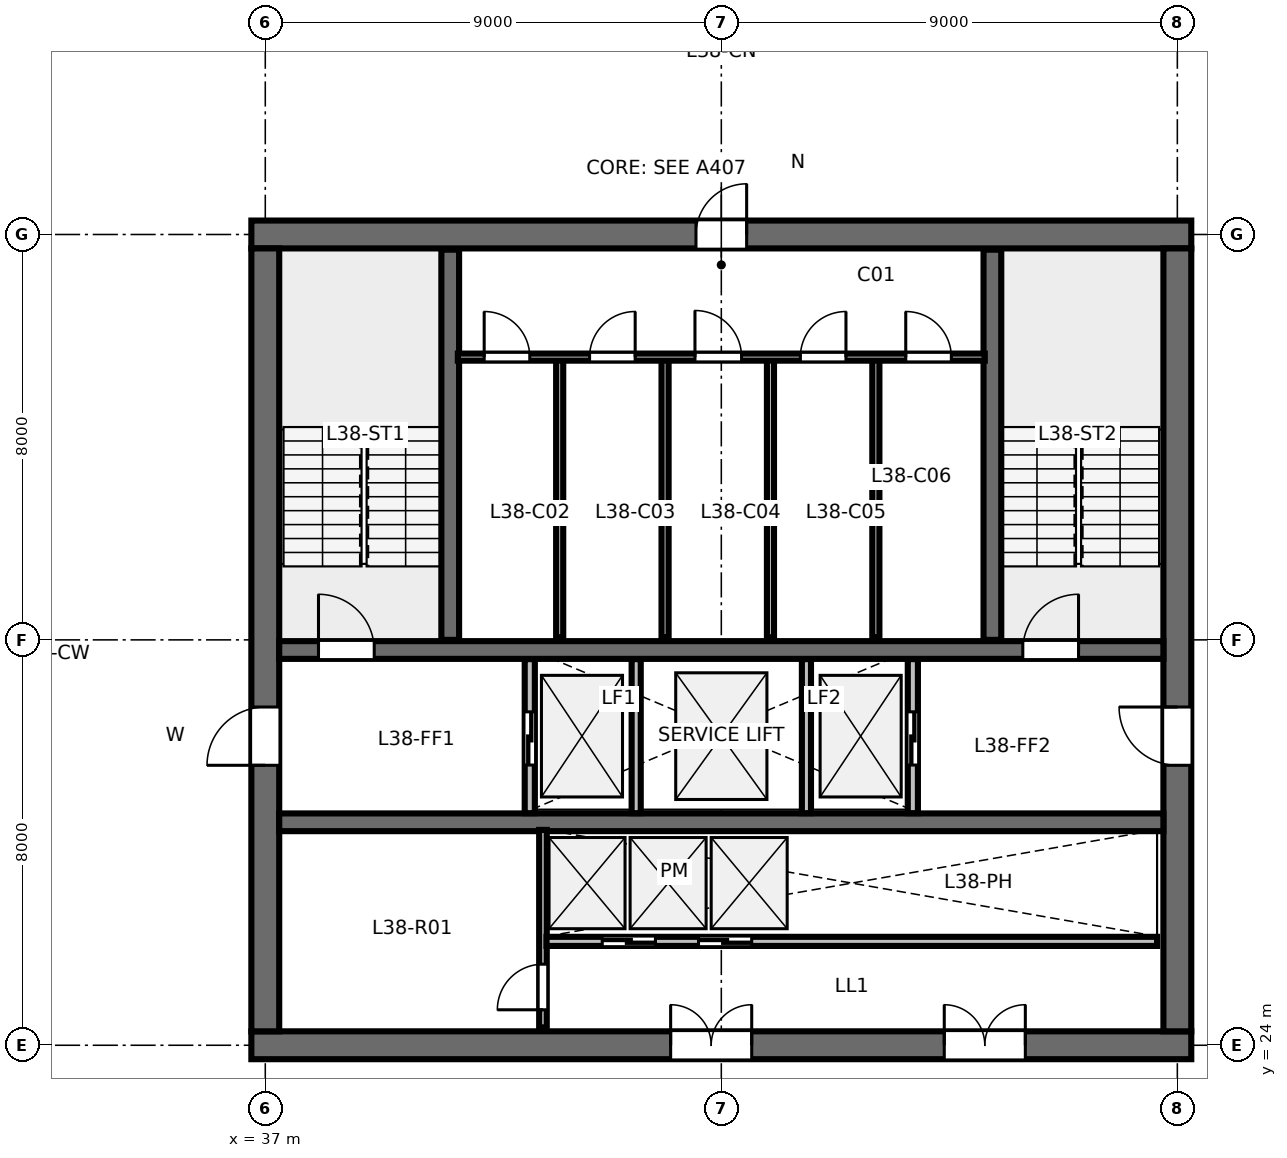
"""IFC4 building model, lengths in metres.
Left out: names, types, materials, properties, quantities, classifications, styles, units other than length and angle.
Written with IfcOpenShell. Run it as: python <this file> out.ifc"""

import sys

from ifc_helpers import new_model, si_unit, direction, frame, frame_2d, origin, place, context, subcontext, project, spatial, rectangle, extrude, element, fill, save


model = new_model("IFC4")
c1 = context("Model", 3, precision=1e-05, world=origin(), true_north=direction((0.0, 1.0)))
c2 = subcontext(c1, "Body", "Model", "MODEL_VIEW")
j1 = project(units=[si_unit("LENGTHUNIT", "METRE"), si_unit("PLANEANGLEUNIT", "RADIAN")], contexts=[c1])
p1 = place(None, origin())
s1 = spatial("IfcSite", under=j1, at=p1, CompositionType="ELEMENT")
p2 = place(p1, origin())
s2 = spatial("IfcBuilding", under=s1, at=p2, CompositionType="ELEMENT")
p3 = place(p2, frame((0.0, 0.0, 145.6)))
s3 = spatial("IfcBuildingStorey", under=s2, at=p3, CompositionType="ELEMENT", Elevation=145.6)
p4 = place(p3, frame((36.725, 24.0, 0.0), z_axis=(0.0, 0.0, 1.0), x_axis=(1.0, 0.0, 0.0)))
e1 = element("IfcWall", 1, at=p4, inside=s3, PredefinedType="SHEAR", context=c2, shape_type="SweptSolid", body=[
    extrude(rectangle(XDim=18.55, YDim=0.55, at=frame_2d((9.275, 0.0))), origin(), (0.0, 0.0, 1.0), 3.36),
])
p5 = place(p4, frame((8.275, 0.0, 0.0)))
e2 = element("IfcOpeningElement", 2, at=p5, cuts=e1, PredefinedType="OPENING", context=c2, shape_type="SweptSolid", body=[
    extrude(rectangle(XDim=1.6, YDim=2.15, at=frame_2d((0.8, 1.075))), frame((0.0, 0.285, 0.0), z_axis=(0.0, -1.0, 0.0), x_axis=(1.0, 0.0, 0.0)), (0.0, 0.0, 1.0), 0.57),
])
p6 = place(p4, frame((13.675, 0.0, 0.0)))
e3 = element("IfcOpeningElement", 3, at=p6, cuts=e1, PredefinedType="OPENING", context=c2, shape_type="SweptSolid", body=[
    extrude(rectangle(XDim=1.6, YDim=2.15, at=frame_2d((0.8, 1.075))), frame((0.0, 0.285, 0.0), z_axis=(0.0, -1.0, 0.0), x_axis=(1.0, 0.0, 0.0)), (0.0, 0.0, 1.0), 0.57),
])
p7 = place(p3, frame((36.725, 40.0, 0.0), z_axis=(0.0, 0.0, 1.0), x_axis=(1.0, 0.0, 0.0)))
e4 = element("IfcWall", 4, at=p7, inside=s3, PredefinedType="SHEAR", context=c2, shape_type="SweptSolid", body=[
    extrude(rectangle(XDim=18.55, YDim=0.55, at=frame_2d((9.275, 0.0))), origin(), (0.0, 0.0, 1.0), 3.36),
])
p8 = place(p7, frame((8.775, 0.0, 0.0)))
e5 = element("IfcOpeningElement", 5, at=p8, cuts=e4, PredefinedType="OPENING", context=c2, shape_type="SweptSolid", body=[
    extrude(rectangle(XDim=1.0, YDim=2.15, at=frame_2d((0.5, 1.075))), frame((0.0, 0.285, 0.0), z_axis=(0.0, -1.0, 0.0), x_axis=(1.0, 0.0, 0.0)), (0.0, 0.0, 1.0), 0.57),
])
p9 = place(p3, frame((37.0, 24.275, 0.0), z_axis=(0.0, 0.0, 1.0), x_axis=(0.0, 1.0, 0.0)))
e6 = element("IfcWall", 6, at=p9, inside=s3, PredefinedType="SHEAR", context=c2, shape_type="SweptSolid", body=[
    extrude(rectangle(XDim=15.45, YDim=0.55, at=frame_2d((7.725, 0.0))), origin(), (0.0, 0.0, 1.0), 3.36),
])
p10 = place(p9, frame((5.25, 0.0, 0.0)))
e7 = element("IfcOpeningElement", 7, at=p10, cuts=e6, PredefinedType="OPENING", context=c2, shape_type="SweptSolid", body=[
    extrude(rectangle(XDim=1.15, YDim=2.15, at=frame_2d((0.575, 1.075))), frame((0.0, 0.285, 0.0), z_axis=(0.0, -1.0, 0.0), x_axis=(1.0, 0.0, 0.0)), (0.0, 0.0, 1.0), 0.57),
])
p11 = place(p3, frame((55.0, 24.275, 0.0), z_axis=(0.0, 0.0, 1.0), x_axis=(0.0, 1.0, 0.0)))
e8 = element("IfcWall", 8, at=p11, inside=s3, PredefinedType="SHEAR", context=c2, shape_type="SweptSolid", body=[
    extrude(rectangle(XDim=15.45, YDim=0.55, at=frame_2d((7.725, 0.0))), origin(), (0.0, 0.0, 1.0), 3.36),
])
p12 = place(p11, frame((5.25, 0.0, 0.0)))
e9 = element("IfcOpeningElement", 9, at=p12, cuts=e8, PredefinedType="OPENING", context=c2, shape_type="SweptSolid", body=[
    extrude(rectangle(XDim=1.15, YDim=2.15, at=frame_2d((0.575, 1.075))), frame((0.0, 0.285, 0.0), z_axis=(0.0, -1.0, 0.0), x_axis=(1.0, 0.0, 0.0)), (0.0, 0.0, 1.0), 0.57),
])
p13 = place(p3, frame((37.275, 31.8, 0.0), z_axis=(0.0, 0.0, 1.0), x_axis=(1.0, 0.0, 0.0)))
e10 = element("IfcWall", 10, at=p13, inside=s3, PredefinedType="SHEAR", context=c2, shape_type="SweptSolid", body=[
    extrude(rectangle(XDim=17.45, YDim=0.35, at=frame_2d((8.725, 0.0))), origin(), (0.0, 0.0, 1.0), 3.36),
])
p14 = place(p13, frame((0.775, 0.0, 0.0)))
e11 = element("IfcOpeningElement", 11, at=p14, cuts=e10, PredefinedType="OPENING", context=c2, shape_type="SweptSolid", body=[
    extrude(rectangle(XDim=1.1, YDim=2.15, at=frame_2d((0.55, 1.075))), frame((0.0, 0.185, 0.0), z_axis=(0.0, -1.0, 0.0), x_axis=(1.0, 0.0, 0.0)), (0.0, 0.0, 1.0), 0.37),
])
p15 = place(p13, frame((14.675, 0.0, 0.0)))
e12 = element("IfcOpeningElement", 12, at=p15, cuts=e10, PredefinedType="OPENING", context=c2, shape_type="SweptSolid", body=[
    extrude(rectangle(XDim=1.1, YDim=2.15, at=frame_2d((0.55, 1.075))), frame((0.0, 0.185, 0.0), z_axis=(0.0, -1.0, 0.0), x_axis=(1.0, 0.0, 0.0)), (0.0, 0.0, 1.0), 0.37),
])
p16 = place(p3, frame((37.275, 28.4, 0.0), z_axis=(0.0, 0.0, 1.0), x_axis=(1.0, 0.0, 0.0)))
e13 = element("IfcWall", 13, at=p16, inside=s3, PredefinedType="SHEAR", context=c2, shape_type="SweptSolid", body=[
    extrude(rectangle(XDim=17.45, YDim=0.35, at=frame_2d((8.725, 0.0))), origin(), (0.0, 0.0, 1.0), 3.36),
])
for number, where, z_axis, x_axis in (
    (14, (40.65, 32.0, 0.0), (0.0, 0.0, 1.0), (0.0, 1.0, 0.0)),
    (15, (51.35, 32.0, 0.0), (0.0, 0.0, 1.0), (0.0, 1.0, 0.0)),
):
    element("IfcWall", number, at=place(p3, frame(where, z_axis=z_axis, x_axis=x_axis)), inside=s3, PredefinedType="SHEAR", context=c2, shape_type="SweptSolid", body=[
        extrude(rectangle(XDim=7.7, YDim=0.35, at=frame_2d((3.85, 0.0))), origin(), (0.0, 0.0, 1.0), 3.6),
    ])
for number, where, z_axis, x_axis in (
    (16, (42.81, 32.05, 0.0), (0.0, 0.0, 1.0), (0.0, 1.0, 0.0)),
    (17, (44.89, 32.05, 0.0), (0.0, 0.0, 1.0), (0.0, 1.0, 0.0)),
    (18, (46.97, 32.05, 0.0), (0.0, 0.0, 1.0), (0.0, 1.0, 0.0)),
    (19, (49.05, 32.05, 0.0), (0.0, 0.0, 1.0), (0.0, 1.0, 0.0)),
):
    element("IfcWall", number, at=place(p3, frame(where, z_axis=z_axis, x_axis=x_axis)), inside=s3, PredefinedType="PARTITIONING", context=c2, shape_type="SweptSolid", body=[
        extrude(rectangle(XDim=5.5, YDim=0.14, at=frame_2d((2.75, 0.0))), origin(), (0.0, 0.0, 1.0), 3.36),
    ])
p17 = place(p3, frame((40.8, 37.58, 0.0), z_axis=(0.0, 0.0, 1.0), x_axis=(1.0, 0.0, 0.0)))
e20 = element("IfcWall", 20, at=p17, inside=s3, PredefinedType="PARTITIONING", context=c2, shape_type="SweptSolid", body=[
    extrude(rectangle(XDim=10.4, YDim=0.14, at=frame_2d((5.2, 0.0))), origin(), (0.0, 0.0, 1.0), 3.36),
])
p18 = place(p17, frame((0.52, 0.0, 0.0)))
e21 = element("IfcOpeningElement", 21, at=p18, cuts=e20, PredefinedType="OPENING", context=c2, shape_type="SweptSolid", body=[
    extrude(rectangle(XDim=0.9, YDim=2.15, at=frame_2d((0.45, 1.075))), frame((0.0, 0.08, 0.0), z_axis=(0.0, -1.0, 0.0), x_axis=(1.0, 0.0, 0.0)), (0.0, 0.0, 1.0), 0.16),
])
p19 = place(p17, frame((2.6, 0.0, 0.0)))
e22 = element("IfcOpeningElement", 22, at=p19, cuts=e20, PredefinedType="OPENING", context=c2, shape_type="SweptSolid", body=[
    extrude(rectangle(XDim=0.9, YDim=2.15, at=frame_2d((0.45, 1.075))), frame((0.0, 0.08, 0.0), z_axis=(0.0, -1.0, 0.0), x_axis=(1.0, 0.0, 0.0)), (0.0, 0.0, 1.0), 0.16),
])
p20 = place(p17, frame((4.68, 0.0, 0.0)))
e23 = element("IfcOpeningElement", 23, at=p20, cuts=e20, PredefinedType="OPENING", context=c2, shape_type="SweptSolid", body=[
    extrude(rectangle(XDim=0.92, YDim=2.15, at=frame_2d((0.46, 1.075))), frame((0.0, 0.08, 0.0), z_axis=(0.0, -1.0, 0.0), x_axis=(1.0, 0.0, 0.0)), (0.0, 0.0, 1.0), 0.16),
])
p21 = place(p17, frame((6.76, 0.0, 0.0)))
e24 = element("IfcOpeningElement", 24, at=p21, cuts=e20, PredefinedType="OPENING", context=c2, shape_type="SweptSolid", body=[
    extrude(rectangle(XDim=0.9, YDim=2.15, at=frame_2d((0.45, 1.075))), frame((0.0, 0.08, 0.0), z_axis=(0.0, -1.0, 0.0), x_axis=(1.0, 0.0, 0.0)), (0.0, 0.0, 1.0), 0.16),
])
p22 = place(p17, frame((8.84, 0.0, 0.0)))
e25 = element("IfcOpeningElement", 25, at=p22, cuts=e20, PredefinedType="OPENING", context=c2, shape_type="SweptSolid", body=[
    extrude(rectangle(XDim=0.9, YDim=2.15, at=frame_2d((0.45, 1.075))), frame((0.0, 0.08, 0.0), z_axis=(0.0, -1.0, 0.0), x_axis=(1.0, 0.0, 0.0)), (0.0, 0.0, 1.0), 0.16),
])
p23 = place(p3, frame((42.22, 28.58, 0.0), z_axis=(0.0, 0.0, 1.0), x_axis=(0.0, 1.0, 0.0)))
e26 = element("IfcWall", 26, at=p23, inside=s3, PredefinedType="PARTITIONING", context=c2, shape_type="SweptSolid", body=[
    extrude(rectangle(XDim=3.04, YDim=0.2, at=frame_2d((1.52, 0.0))), origin(), (0.0, 0.0, 1.0), 3.36),
])
p24 = place(p23, frame((0.95, 0.0, 0.0)))
e27 = element("IfcOpeningElement", 27, at=p24, cuts=e26, PredefinedType="OPENING", context=c2, shape_type="SweptSolid", body=[
    extrude(rectangle(XDim=1.05, YDim=2.15, at=frame_2d((0.525, 1.075))), frame((0.0, 0.11, 0.0), z_axis=(0.0, -1.0, 0.0), x_axis=(1.0, 0.0, 0.0)), (0.0, 0.0, 1.0), 0.22),
])
p25 = place(p3, frame((49.78, 28.58, 0.0), z_axis=(0.0, 0.0, 1.0), x_axis=(0.0, 1.0, 0.0)))
e28 = element("IfcWall", 28, at=p25, inside=s3, PredefinedType="PARTITIONING", context=c2, shape_type="SweptSolid", body=[
    extrude(rectangle(XDim=3.04, YDim=0.2, at=frame_2d((1.52, 0.0))), origin(), (0.0, 0.0, 1.0), 3.36),
])
p26 = place(p25, frame((0.95, 0.0, 0.0)))
e29 = element("IfcOpeningElement", 29, at=p26, cuts=e28, PredefinedType="OPENING", context=c2, shape_type="SweptSolid", body=[
    extrude(rectangle(XDim=1.05, YDim=2.15, at=frame_2d((0.525, 1.075))), frame((0.0, 0.11, 0.0), z_axis=(0.0, -1.0, 0.0), x_axis=(1.0, 0.0, 0.0)), (0.0, 0.0, 1.0), 0.22),
])
for number, where, z_axis, x_axis in (
    (30, (44.32, 28.58, 0.0), (0.0, 0.0, 1.0), (0.0, 1.0, 0.0)),
    (31, (47.68, 28.58, 0.0), (0.0, 0.0, 1.0), (0.0, 1.0, 0.0)),
):
    element("IfcWall", number, at=place(p3, frame(where, z_axis=z_axis, x_axis=x_axis)), inside=s3, PredefinedType="PARTITIONING", context=c2, shape_type="SweptSolid", body=[
        extrude(rectangle(XDim=3.04, YDim=0.18, at=frame_2d((1.52, 0.0))), origin(), (0.0, 0.0, 1.0), 3.36),
    ])
p27 = place(p3, frame((42.48, 24.35, 0.0), z_axis=(0.0, 0.0, 1.0), x_axis=(0.0, 1.0, 0.0)))
e32 = element("IfcWall", 32, at=p27, inside=s3, PredefinedType="PARTITIONING", context=c2, shape_type="SweptSolid", body=[
    extrude(rectangle(XDim=3.9, YDim=0.15, at=frame_2d((1.95, 0.0))), origin(), (0.0, 0.0, 1.0), 3.36),
])
p28 = place(p27, frame((0.35, 0.0, 0.0)))
e33 = element("IfcOpeningElement", 33, at=p28, cuts=e32, PredefinedType="OPENING", context=c2, shape_type="SweptSolid", body=[
    extrude(rectangle(XDim=0.9, YDim=2.15, at=frame_2d((0.45, 1.075))), frame((0.0, 0.085, 0.0), z_axis=(0.0, -1.0, 0.0), x_axis=(1.0, 0.0, 0.0)), (0.0, 0.0, 1.0), 0.17),
])
p29 = place(p3, frame((42.55, 26.05, 0.0), z_axis=(0.0, 0.0, 1.0), x_axis=(1.0, 0.0, 0.0)))
e34 = element("IfcWall", 34, at=p29, inside=s3, PredefinedType="PARTITIONING", context=c2, shape_type="SweptSolid", body=[
    extrude(rectangle(XDim=12.05, YDim=0.18, at=frame_2d((6.025, 0.0))), origin(), (0.0, 0.0, 1.0), 3.36),
])
p30 = place(p29, frame((1.1, 0.0, 0.0)))
e35 = element("IfcOpeningElement", 35, at=p30, cuts=e34, PredefinedType="OPENING", context=c2, shape_type="SweptSolid", body=[
    extrude(rectangle(XDim=1.05, YDim=2.15, at=frame_2d((0.525, 1.075))), frame((0.0, 0.1, 0.0), z_axis=(0.0, -1.0, 0.0), x_axis=(1.0, 0.0, 0.0)), (0.0, 0.0, 1.0), 0.2),
])
p31 = place(p29, frame((3.0, 0.0, 0.0)))
e36 = element("IfcOpeningElement", 36, at=p31, cuts=e34, PredefinedType="OPENING", context=c2, shape_type="SweptSolid", body=[
    extrude(rectangle(XDim=1.05, YDim=2.15, at=frame_2d((0.525, 1.075))), frame((0.0, 0.1, 0.0), z_axis=(0.0, -1.0, 0.0), x_axis=(1.0, 0.0, 0.0)), (0.0, 0.0, 1.0), 0.2),
])
p32 = place(p14, origin())
e37 = element("IfcDoor", 37, at=p32, inside=s3, OperationType="SINGLE_SWING_LEFT", PredefinedType="DOOR", context=c2, shape_type="SweptSolid", body=[
    extrude(rectangle(XDim=1.1, YDim=2.15, at=frame_2d((0.55, 1.075))), frame((0.0, 0.025, 0.0), z_axis=(0.0, -1.0, 0.0), x_axis=(1.0, 0.0, 0.0)), (0.0, 0.0, 1.0), 0.05),
])
fill(e11, e37)
p33 = place(p15, origin())
e38 = element("IfcDoor", 38, at=p33, inside=s3, OperationType="SINGLE_SWING_RIGHT", PredefinedType="DOOR", context=c2, shape_type="SweptSolid", body=[
    extrude(rectangle(XDim=1.1, YDim=2.15, at=frame_2d((0.55, 1.075))), frame((0.0, 0.025, 0.0), z_axis=(0.0, -1.0, 0.0), x_axis=(1.0, 0.0, 0.0)), (0.0, 0.0, 1.0), 0.05),
])
fill(e12, e38)
p34 = place(p8, origin())
e39 = element("IfcDoor", 39, at=p34, inside=s3, OperationType="SINGLE_SWING_RIGHT", PredefinedType="DOOR", context=c2, shape_type="SweptSolid", body=[
    extrude(rectangle(XDim=1.0, YDim=2.15, at=frame_2d((0.5, 1.075))), frame((0.0, 0.025, 0.0), z_axis=(0.0, -1.0, 0.0), x_axis=(1.0, 0.0, 0.0)), (0.0, 0.0, 1.0), 0.05),
])
fill(e5, e39)
p35 = place(p10, origin())
e40 = element("IfcDoor", 40, at=p35, inside=s3, OperationType="SINGLE_SWING_LEFT", PredefinedType="DOOR", context=c2, shape_type="SweptSolid", body=[
    extrude(rectangle(XDim=1.15, YDim=2.15, at=frame_2d((0.575, 1.075))), frame((0.0, 0.025, 0.0), z_axis=(0.0, -1.0, 0.0), x_axis=(1.0, 0.0, 0.0)), (0.0, 0.0, 1.0), 0.05),
])
fill(e7, e40)
p36 = place(p12, origin())
e41 = element("IfcDoor", 41, at=p36, inside=s3, OperationType="SINGLE_SWING_RIGHT", PredefinedType="DOOR", context=c2, shape_type="SweptSolid", body=[
    extrude(rectangle(XDim=1.15, YDim=2.15, at=frame_2d((0.575, 1.075))), frame((0.0, 0.025, 0.0), z_axis=(0.0, -1.0, 0.0), x_axis=(1.0, 0.0, 0.0)), (0.0, 0.0, 1.0), 0.05),
])
fill(e9, e41)
p37 = place(p5, origin())
e42 = element("IfcDoor", 42, at=p37, inside=s3, OperationType="DOUBLE_DOOR_SINGLE_SWING", PredefinedType="DOOR", context=c2, shape_type="SweptSolid", body=[
    extrude(rectangle(XDim=1.6, YDim=2.15, at=frame_2d((0.8, 1.075))), frame((0.0, 0.025, 0.0), z_axis=(0.0, -1.0, 0.0), x_axis=(1.0, 0.0, 0.0)), (0.0, 0.0, 1.0), 0.05),
])
fill(e2, e42)
p38 = place(p6, origin())
e43 = element("IfcDoor", 43, at=p38, inside=s3, OperationType="DOUBLE_DOOR_SINGLE_SWING", PredefinedType="DOOR", context=c2, shape_type="SweptSolid", body=[
    extrude(rectangle(XDim=1.6, YDim=2.15, at=frame_2d((0.8, 1.075))), frame((0.0, 0.025, 0.0), z_axis=(0.0, -1.0, 0.0), x_axis=(1.0, 0.0, 0.0)), (0.0, 0.0, 1.0), 0.05),
])
fill(e3, e43)
p39 = place(p18, origin())
e44 = element("IfcDoor", 44, at=p39, inside=s3, OperationType="SINGLE_SWING_LEFT", PredefinedType="DOOR", context=c2, shape_type="SweptSolid", body=[
    extrude(rectangle(XDim=0.9, YDim=2.15, at=frame_2d((0.45, 1.075))), frame((0.0, 0.025, 0.0), z_axis=(0.0, -1.0, 0.0), x_axis=(1.0, 0.0, 0.0)), (0.0, 0.0, 1.0), 0.05),
])
fill(e21, e44)
p40 = place(p19, origin())
e45 = element("IfcDoor", 45, at=p40, inside=s3, OperationType="SINGLE_SWING_RIGHT", PredefinedType="DOOR", context=c2, shape_type="SweptSolid", body=[
    extrude(rectangle(XDim=0.9, YDim=2.15, at=frame_2d((0.45, 1.075))), frame((0.0, 0.025, 0.0), z_axis=(0.0, -1.0, 0.0), x_axis=(1.0, 0.0, 0.0)), (0.0, 0.0, 1.0), 0.05),
])
fill(e22, e45)
p41 = place(p20, origin())
e46 = element("IfcDoor", 46, at=p41, inside=s3, OperationType="SINGLE_SWING_LEFT", PredefinedType="DOOR", context=c2, shape_type="SweptSolid", body=[
    extrude(rectangle(XDim=0.92, YDim=2.15, at=frame_2d((0.46, 1.075))), frame((0.0, 0.025, 0.0), z_axis=(0.0, -1.0, 0.0), x_axis=(1.0, 0.0, 0.0)), (0.0, 0.0, 1.0), 0.05),
])
fill(e23, e46)
p42 = place(p21, origin())
e47 = element("IfcDoor", 47, at=p42, inside=s3, OperationType="SINGLE_SWING_RIGHT", PredefinedType="DOOR", context=c2, shape_type="SweptSolid", body=[
    extrude(rectangle(XDim=0.9, YDim=2.15, at=frame_2d((0.45, 1.075))), frame((0.0, 0.025, 0.0), z_axis=(0.0, -1.0, 0.0), x_axis=(1.0, 0.0, 0.0)), (0.0, 0.0, 1.0), 0.05),
])
fill(e24, e47)
p43 = place(p22, origin())
e48 = element("IfcDoor", 48, at=p43, inside=s3, OperationType="SINGLE_SWING_LEFT", PredefinedType="DOOR", context=c2, shape_type="SweptSolid", body=[
    extrude(rectangle(XDim=0.9, YDim=2.15, at=frame_2d((0.45, 1.075))), frame((0.0, 0.025, 0.0), z_axis=(0.0, -1.0, 0.0), x_axis=(1.0, 0.0, 0.0)), (0.0, 0.0, 1.0), 0.05),
])
fill(e25, e48)
p44 = place(p24, origin())
e49 = element("IfcDoor", 49, at=p44, inside=s3, OperationType="SLIDING_TO_LEFT", PredefinedType="DOOR", context=c2, shape_type="SweptSolid", body=[
    extrude(rectangle(XDim=1.05, YDim=2.15, at=frame_2d((0.525, 1.075))), frame((0.0, 0.025, 0.0), z_axis=(0.0, -1.0, 0.0), x_axis=(1.0, 0.0, 0.0)), (0.0, 0.0, 1.0), 0.05),
])
fill(e27, e49)
p45 = place(p26, origin())
e50 = element("IfcDoor", 50, at=p45, inside=s3, OperationType="SLIDING_TO_RIGHT", PredefinedType="DOOR", context=c2, shape_type="SweptSolid", body=[
    extrude(rectangle(XDim=1.05, YDim=2.15, at=frame_2d((0.525, 1.075))), frame((0.0, 0.025, 0.0), z_axis=(0.0, -1.0, 0.0), x_axis=(1.0, 0.0, 0.0)), (0.0, 0.0, 1.0), 0.05),
])
fill(e29, e50)
p46 = place(p28, origin())
e51 = element("IfcDoor", 51, at=p46, inside=s3, OperationType="SINGLE_SWING_LEFT", PredefinedType="DOOR", context=c2, shape_type="SweptSolid", body=[
    extrude(rectangle(XDim=0.9, YDim=2.15, at=frame_2d((0.45, 1.075))), frame((0.0, 0.025, 0.0), z_axis=(0.0, -1.0, 0.0), x_axis=(1.0, 0.0, 0.0)), (0.0, 0.0, 1.0), 0.05),
])
fill(e33, e51)
p47 = place(p30, origin())
e52 = element("IfcDoor", 52, at=p47, inside=s3, OperationType="SLIDING_TO_LEFT", PredefinedType="DOOR", context=c2, shape_type="SweptSolid", body=[
    extrude(rectangle(XDim=1.05, YDim=2.15, at=frame_2d((0.525, 1.075))), frame((0.0, 0.025, 0.0), z_axis=(0.0, -1.0, 0.0), x_axis=(1.0, 0.0, 0.0)), (0.0, 0.0, 1.0), 0.05),
])
fill(e35, e52)
p48 = place(p31, origin())
e53 = element("IfcDoor", 53, at=p48, inside=s3, OperationType="SLIDING_TO_RIGHT", PredefinedType="DOOR", context=c2, shape_type="SweptSolid", body=[
    extrude(rectangle(XDim=1.05, YDim=2.15, at=frame_2d((0.525, 1.075))), frame((0.0, 0.025, 0.0), z_axis=(0.0, -1.0, 0.0), x_axis=(1.0, 0.0, 0.0)), (0.0, 0.0, 1.0), 0.05),
])
fill(e36, e53)
save(model, sys.argv[1])
